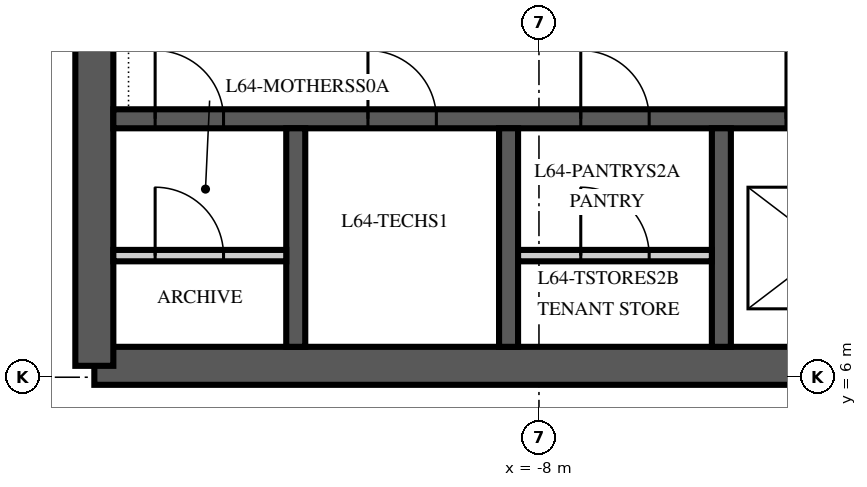
"""IFC4 building model, lengths in metres.
Left out: names, types, materials, properties, quantities, classifications, styles, units other than length and angle.
Written with IfcOpenShell. Run it as: python <this file> out.ifc"""

import sys

from ifc_helpers import new_model, si_unit, direction, frame, frame_2d, origin, place, context, subcontext, project, spatial, polyline, rectangle, outline, extrude, element, fill, save


model = new_model("IFC4")
c1 = context("Model", 3, precision=1e-05, world=origin(), true_north=direction((0.0, 1.0)))
c2 = subcontext(c1, "Body", "Model", "MODEL_VIEW")
j1 = project(units=[si_unit("LENGTHUNIT", "METRE"), si_unit("PLANEANGLEUNIT", "RADIAN")], contexts=[c1])
p1 = place(None, origin())
s1 = spatial("IfcSite", under=j1, at=p1, CompositionType="ELEMENT")
p2 = place(p1, origin())
s2 = spatial("IfcBuilding", under=s1, at=p2, CompositionType="ELEMENT")
p3 = place(p2, frame((0.0, 0.0, 276.0)))
s3 = spatial("IfcBuildingStorey", under=s2, at=p3, CompositionType="ELEMENT", Elevation=276.0)
p4 = place(p3, frame((-13.85, 6.15, 0.0), z_axis=(0.0, 0.0, 1.0), x_axis=(1.0, 0.0, 0.0)))
e1 = element("IfcWall", 1, at=p4, inside=s3, PredefinedType="SHEAR", context=c2, shape_type="SweptSolid", body=[
    extrude(rectangle(XDim=27.7, YDim=0.5, at=frame_2d((13.85, 0.0))), origin(), (0.0, 0.0, 1.0), 4.0),
])
p5 = place(p3, frame((-13.85, 23.85, 0.0), z_axis=(0.0, 0.0, 1.0), x_axis=(0.0, -1.0, 0.0)))
e2 = element("IfcWall", 2, at=p5, inside=s3, PredefinedType="SHEAR", context=c2, shape_type="SweptSolid", body=[
    extrude(outline(polyline([(0.0, -0.25), (17.7, -0.25), (17.7, 0.0), (17.45, 0.0), (17.45, 0.25), (0.25, 0.25), (0.25, 0.0), (0.0, 0.0), (0.0, -0.25)])), origin(), (0.0, 0.0, 1.0), 4.0),
])
p6 = place(p5, frame((11.75, 0.0, 0.0)))
e3 = element("IfcOpeningElement", 3, at=p6, cuts=e2, PredefinedType="OPENING", context=c2, shape_type="SweptSolid", body=[
    extrude(rectangle(XDim=1.8, YDim=2.4, at=frame_2d((0.9, 1.2))), frame((0.0, 0.265, 0.0), z_axis=(0.0, -1.0, 0.0), x_axis=(1.0, 0.0, 0.0)), (0.0, 0.0, 1.0), 0.53),
])
p7 = place(p3, frame((-13.6, 9.4, 0.0), z_axis=(0.0, 0.0, 1.0), x_axis=(1.0, 0.0, 0.0)))
e4 = element("IfcWall", 4, at=p7, inside=s3, PredefinedType="SHEAR", context=c2, shape_type="SweptSolid", body=[
    extrude(rectangle(XDim=27.2, YDim=0.25, at=frame_2d((13.6, 0.0))), origin(), (0.0, 0.0, 1.0), 4.0),
])
p8 = place(p7, frame((8.85, 0.0, 0.0)))
e5 = element("IfcOpeningElement", 5, at=p8, cuts=e4, PredefinedType="OPENING", context=c2, shape_type="SweptSolid", body=[
    extrude(rectangle(XDim=1.1, YDim=2.1, at=frame_2d((0.55, 1.05))), frame((0.0, 0.14, 0.0), z_axis=(0.0, -1.0, 0.0), x_axis=(1.0, 0.0, 0.0)), (0.0, 0.0, 1.0), 0.28),
])
p9 = place(p7, frame((11.65, 0.0, 0.0)))
e6 = element("IfcOpeningElement", 6, at=p9, cuts=e4, PredefinedType="OPENING", context=c2, shape_type="SweptSolid", body=[
    extrude(rectangle(XDim=1.1, YDim=2.1, at=frame_2d((0.55, 1.05))), frame((0.0, 0.14, 0.0), z_axis=(0.0, -1.0, 0.0), x_axis=(1.0, 0.0, 0.0)), (0.0, 0.0, 1.0), 0.28),
])
p10 = place(p7, frame((14.45, 0.0, 0.0)))
e7 = element("IfcOpeningElement", 7, at=p10, cuts=e4, PredefinedType="OPENING", context=c2, shape_type="SweptSolid", body=[
    extrude(rectangle(XDim=1.1, YDim=2.1, at=frame_2d((0.55, 1.05))), frame((0.0, 0.14, 0.0), z_axis=(0.0, -1.0, 0.0), x_axis=(1.0, 0.0, 0.0)), (0.0, 0.0, 1.0), 0.28),
])
p11 = place(p7, frame((0.55, 0.0, 0.0)))
e8 = element("IfcOpeningElement", 8, at=p11, cuts=e4, PredefinedType="OPENING", context=c2, shape_type="SweptSolid", body=[
    extrude(rectangle(XDim=0.9, YDim=2.1, at=frame_2d((0.45, 1.05))), frame((0.0, 0.14, 0.0), z_axis=(0.0, -1.0, 0.0), x_axis=(1.0, 0.0, 0.0)), (0.0, 0.0, 1.0), 0.28),
])
p12 = place(p7, frame((3.35, 0.0, 0.0)))
e9 = element("IfcOpeningElement", 9, at=p12, cuts=e4, PredefinedType="OPENING", context=c2, shape_type="SweptSolid", body=[
    extrude(rectangle(XDim=0.9, YDim=2.1, at=frame_2d((0.45, 1.05))), frame((0.0, 0.14, 0.0), z_axis=(0.0, -1.0, 0.0), x_axis=(1.0, 0.0, 0.0)), (0.0, 0.0, 1.0), 0.28),
])
p13 = place(p7, frame((6.15, 0.0, 0.0)))
e10 = element("IfcOpeningElement", 10, at=p13, cuts=e4, PredefinedType="OPENING", context=c2, shape_type="SweptSolid", body=[
    extrude(rectangle(XDim=0.9, YDim=2.1, at=frame_2d((0.45, 1.05))), frame((0.0, 0.14, 0.0), z_axis=(0.0, -1.0, 0.0), x_axis=(1.0, 0.0, 0.0)), (0.0, 0.0, 1.0), 0.28),
])
p14 = place(p7, frame((17.35, 0.0, 0.0)))
e11 = element("IfcOpeningElement", 11, at=p14, cuts=e4, PredefinedType="OPENING", context=c2, shape_type="SweptSolid", body=[
    extrude(rectangle(XDim=0.9, YDim=2.1, at=frame_2d((0.45, 1.05))), frame((0.0, 0.14, 0.0), z_axis=(0.0, -1.0, 0.0), x_axis=(1.0, 0.0, 0.0)), (0.0, 0.0, 1.0), 0.28),
])
p15 = place(p7, frame((20.15, 0.0, 0.0)))
e12 = element("IfcOpeningElement", 12, at=p15, cuts=e4, PredefinedType="OPENING", context=c2, shape_type="SweptSolid", body=[
    extrude(rectangle(XDim=0.9, YDim=2.1, at=frame_2d((0.45, 1.05))), frame((0.0, 0.14, 0.0), z_axis=(0.0, -1.0, 0.0), x_axis=(1.0, 0.0, 0.0)), (0.0, 0.0, 1.0), 0.28),
])
p16 = place(p7, frame((22.95, 0.0, 0.0)))
e13 = element("IfcOpeningElement", 13, at=p16, cuts=e4, PredefinedType="OPENING", context=c2, shape_type="SweptSolid", body=[
    extrude(rectangle(XDim=0.9, YDim=2.1, at=frame_2d((0.45, 1.05))), frame((0.0, 0.14, 0.0), z_axis=(0.0, -1.0, 0.0), x_axis=(1.0, 0.0, 0.0)), (0.0, 0.0, 1.0), 0.28),
])
for number, where, z_axis, x_axis in (
    (14, (-11.2, 6.4, 0.0), (0.0, 0.0, 1.0), (0.0, 1.0, 0.0)),
    (15, (-8.4, 6.4, 0.0), (0.0, 0.0, 1.0), (0.0, 1.0, 0.0)),
    (16, (-5.6, 6.4, 0.0), (0.0, 0.0, 1.0), (0.0, 1.0, 0.0)),
):
    element("IfcWall", number, at=place(p3, frame(where, z_axis=z_axis, x_axis=x_axis)), inside=s3, PredefinedType="SHEAR", context=c2, shape_type="SweptSolid", body=[
        extrude(rectangle(XDim=2.875, YDim=0.25, at=frame_2d((1.438, 0.0))), origin(), (0.0, 0.0, 1.0), 4.0),
    ])
p17 = place(p3, frame((-13.6, 7.6, 0.0), z_axis=(0.0, 0.0, 1.0), x_axis=(1.0, 0.0, 0.0)))
e17 = element("IfcWall", 17, at=p17, inside=s3, PredefinedType="PARTITIONING", context=c2, shape_type="SweptSolid", body=[
    extrude(rectangle(XDim=2.275, YDim=0.15, at=frame_2d((1.138, 0.0))), origin(), (0.0, 0.0, 1.0), 3.85),
])
p18 = place(p17, frame((0.55, 0.0, 0.0)))
e18 = element("IfcOpeningElement", 18, at=p18, cuts=e17, PredefinedType="OPENING", context=c2, shape_type="SweptSolid", body=[
    extrude(rectangle(XDim=0.9, YDim=2.1, at=frame_2d((0.45, 1.05))), frame((0.0, 0.09, 0.0), z_axis=(0.0, -1.0, 0.0), x_axis=(1.0, 0.0, 0.0)), (0.0, 0.0, 1.0), 0.18),
])
p19 = place(p3, frame((-8.275, 7.6, 0.0), z_axis=(0.0, 0.0, 1.0), x_axis=(1.0, 0.0, 0.0)))
e19 = element("IfcWall", 19, at=p19, inside=s3, PredefinedType="PARTITIONING", context=c2, shape_type="SweptSolid", body=[
    extrude(rectangle(XDim=2.55, YDim=0.15, at=frame_2d((1.275, 0.0))), origin(), (0.0, 0.0, 1.0), 3.85),
])
p20 = place(p19, frame((0.825, 0.0, 0.0)))
e20 = element("IfcOpeningElement", 20, at=p20, cuts=e19, PredefinedType="OPENING", context=c2, shape_type="SweptSolid", body=[
    extrude(rectangle(XDim=0.9, YDim=2.1, at=frame_2d((0.45, 1.05))), frame((0.0, 0.09, 0.0), z_axis=(0.0, -1.0, 0.0), x_axis=(1.0, 0.0, 0.0)), (0.0, 0.0, 1.0), 0.18),
])
p21 = place(p8, origin())
e21 = element("IfcDoor", 21, at=p21, inside=s3, OperationType="SLIDING_TO_LEFT", PredefinedType="DOOR", context=c2, shape_type="SweptSolid", body=[
    extrude(rectangle(XDim=1.1, YDim=2.1, at=frame_2d((0.55, 1.05))), frame((0.0, 0.125, 0.0), z_axis=(0.0, -1.0, 0.0), x_axis=(1.0, 0.0, 0.0)), (0.0, 0.0, 1.0), 0.25),
])
fill(e5, e21)
p22 = place(p11, origin())
e22 = element("IfcDoor", 22, at=p22, inside=s3, OperationType="SINGLE_SWING_LEFT", PredefinedType="DOOR", context=c2, shape_type="SweptSolid", body=[
    extrude(rectangle(XDim=0.9, YDim=2.1, at=frame_2d((0.45, 1.05))), frame((0.0, 0.125, 0.0), z_axis=(0.0, -1.0, 0.0), x_axis=(1.0, 0.0, 0.0)), (0.0, 0.0, 1.0), 0.25),
])
fill(e8, e22)
p23 = place(p18, origin())
e23 = element("IfcDoor", 23, at=p23, inside=s3, OperationType="SINGLE_SWING_LEFT", PredefinedType="DOOR", context=c2, shape_type="SweptSolid", body=[
    extrude(rectangle(XDim=0.9, YDim=2.1, at=frame_2d((0.45, 1.05))), frame((0.0, 0.075, 0.0), z_axis=(0.0, -1.0, 0.0), x_axis=(1.0, 0.0, 0.0)), (0.0, 0.0, 1.0), 0.149),
])
fill(e18, e23)
p24 = place(p12, origin())
e24 = element("IfcDoor", 24, at=p24, inside=s3, OperationType="SINGLE_SWING_LEFT", PredefinedType="DOOR", context=c2, shape_type="SweptSolid", body=[
    extrude(rectangle(XDim=0.9, YDim=2.1, at=frame_2d((0.45, 1.05))), frame((0.0, 0.125, 0.0), z_axis=(0.0, -1.0, 0.0), x_axis=(1.0, 0.0, 0.0)), (0.0, 0.0, 1.0), 0.25),
])
fill(e9, e24)
p25 = place(p13, origin())
e25 = element("IfcDoor", 25, at=p25, inside=s3, OperationType="SINGLE_SWING_LEFT", PredefinedType="DOOR", context=c2, shape_type="SweptSolid", body=[
    extrude(rectangle(XDim=0.9, YDim=2.1, at=frame_2d((0.45, 1.05))), frame((0.0, 0.125, 0.0), z_axis=(0.0, -1.0, 0.0), x_axis=(1.0, 0.0, 0.0)), (0.0, 0.0, 1.0), 0.25),
])
fill(e10, e25)
p26 = place(p20, origin())
e26 = element("IfcDoor", 26, at=p26, inside=s3, OperationType="SINGLE_SWING_LEFT", PredefinedType="DOOR", context=c2, shape_type="SweptSolid", body=[
    extrude(rectangle(XDim=0.9, YDim=2.1, at=frame_2d((0.45, 1.05))), frame((0.0, 0.075, 0.0), z_axis=(0.0, -1.0, 0.0), x_axis=(1.0, 0.0, 0.0)), (0.0, 0.0, 1.0), 0.149),
])
fill(e20, e26)
save(model, sys.argv[1])
